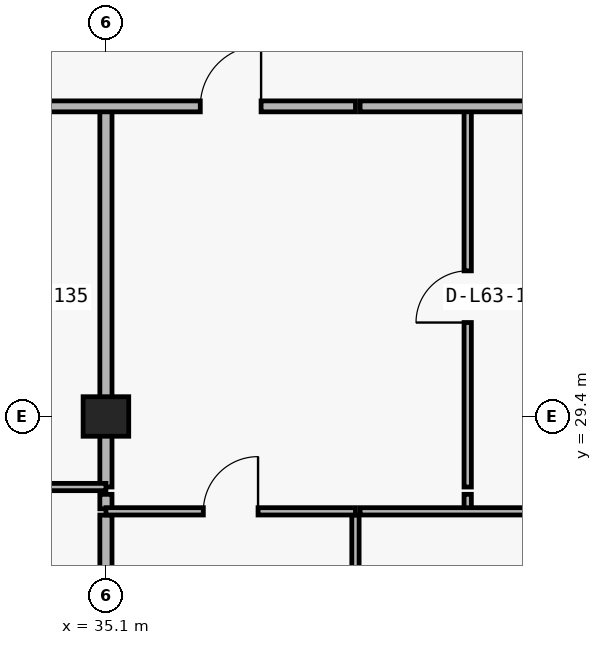
"""IFC4 building model, lengths in metres.
Left out: names, types, materials, properties, quantities, classifications, styles, units other than length and angle.
Written with IfcOpenShell. Run it as: python <this file> out.ifc"""

import sys

from ifc_helpers import new_model, si_unit, direction, frame, frame_2d, origin, origin_2d, place, context, subcontext, project, spatial, rectangle, extrude, element, fill, save


model = new_model("IFC4")
c1 = context("Model", 3, precision=1e-05, world=origin(), true_north=direction((0.0, 1.0)))
c2 = subcontext(c1, "Body", "Model", "MODEL_VIEW")
j1 = project(units=[si_unit("LENGTHUNIT", "METRE"), si_unit("PLANEANGLEUNIT", "RADIAN")], contexts=[c1])
p1 = place(None, origin())
s1 = spatial("IfcSite", under=j1, at=p1, CompositionType="ELEMENT")
p2 = place(p1, origin())
s2 = spatial("IfcBuilding", under=s1, at=p2, CompositionType="ELEMENT")
p3 = place(p2, frame((0.0, 0.0, 226.5)))
s3 = spatial("IfcBuildingStorey", under=s2, at=p3, CompositionType="ELEMENT", Elevation=226.5)
p4 = place(p3, frame((35.1, 29.4, 0.0), z_axis=(0.0, 0.0, 1.0), x_axis=(1.0, 0.0, 0.0)))
e1 = element("IfcColumn", 1, at=p4, inside=s3, PredefinedType="COLUMN", context=c2, shape_type="SweptSolid", body=[
    extrude(rectangle(XDim=0.75, YDim=0.65, at=origin_2d()), origin(), (0.0, 0.0, 1.0), 3.05),
])
p5 = place(p3, frame((35.1, 23.09, 0.0), z_axis=(0.0, 0.0, 1.0), x_axis=(0.0, 1.0, 0.0)))
e2 = element("IfcWall", 2, at=p5, inside=s3, PredefinedType="PARTITIONING", context=c2, shape_type="SweptSolid", body=[
    extrude(rectangle(XDim=4.69, YDim=0.2, at=frame_2d((2.345, 0.0))), origin(), (0.0, 0.0, 1.0), 2.263),
])
p6 = place(p3, frame((35.1, 27.88, 0.0), z_axis=(0.0, 0.0, 1.0), x_axis=(0.0, 1.0, 0.0)))
e3 = element("IfcWall", 3, at=p6, inside=s3, PredefinedType="PARTITIONING", context=c2, shape_type="SweptSolid", body=[
    extrude(rectangle(XDim=0.24, YDim=0.2, at=frame_2d((0.12, 0.0))), origin(), (0.0, 0.0, 1.0), 2.263),
])
p7 = place(p3, frame((35.1, 28.24, 0.0), z_axis=(0.0, 0.0, 1.0), x_axis=(0.0, 1.0, 0.0)))
e4 = element("IfcWall", 4, at=p7, inside=s3, PredefinedType="PARTITIONING", context=c2, shape_type="SweptSolid", body=[
    extrude(rectangle(XDim=6.26, YDim=0.2, at=frame_2d((3.13, 0.0))), origin(), (0.0, 0.0, 1.0), 2.263),
])
p8 = place(p3, frame((39.204, 23.09, 0.0), z_axis=(0.0, 0.0, 1.0), x_axis=(0.0, 1.0, 0.0)))
e5 = element("IfcWall", 5, at=p8, inside=s3, PredefinedType="PARTITIONING", context=c2, shape_type="SweptSolid", body=[
    extrude(rectangle(XDim=4.69, YDim=0.12, at=frame_2d((2.345, 0.0))), origin(), (0.0, 0.0, 1.0), 3.05),
])
p9 = place(p8, frame((1.895, 0.0, 0.0)))
e6 = element("IfcOpeningElement", 6, at=p9, cuts=e5, PredefinedType="OPENING", context=c2, shape_type="SweptSolid", body=[
    extrude(rectangle(XDim=0.9, YDim=2.15, at=frame_2d((0.45, 1.075))), frame((0.0, 0.07, 0.0), z_axis=(0.0, -1.0, 0.0), x_axis=(1.0, 0.0, 0.0)), (0.0, 0.0, 1.0), 0.14),
])
p10 = place(p3, frame((41.05, 27.88, 0.0), z_axis=(0.0, 0.0, 1.0), x_axis=(0.0, 1.0, 0.0)))
e7 = element("IfcWall", 7, at=p10, inside=s3, PredefinedType="PARTITIONING", context=c2, shape_type="SweptSolid", body=[
    extrude(rectangle(XDim=0.24, YDim=0.12, at=frame_2d((0.12, 0.0))), origin(), (0.0, 0.0, 1.0), 3.05),
])
p11 = place(p3, frame((41.05, 28.24, 0.0), z_axis=(0.0, 0.0, 1.0), x_axis=(0.0, 1.0, 0.0)))
e8 = element("IfcWall", 8, at=p11, inside=s3, PredefinedType="PARTITIONING", context=c2, shape_type="SweptSolid", body=[
    extrude(rectangle(XDim=6.26, YDim=0.12, at=frame_2d((3.13, 0.0))), origin(), (0.0, 0.0, 1.0), 3.05),
])
p12 = place(p11, frame((2.705, 0.0, 0.0)))
e9 = element("IfcOpeningElement", 9, at=p12, cuts=e8, PredefinedType="OPENING", context=c2, shape_type="SweptSolid", body=[
    extrude(rectangle(XDim=0.85, YDim=2.1, at=frame_2d((0.425, 1.05))), frame((0.0, 0.07, 0.0), z_axis=(0.0, -1.0, 0.0), x_axis=(1.0, 0.0, 0.0)), (0.0, 0.0, 1.0), 0.14),
])
p13 = place(p3, frame((35.1, 27.84, 0.0), z_axis=(0.0, 0.0, 1.0), x_axis=(1.0, 0.0, 0.0)))
e10 = element("IfcWall", 10, at=p13, inside=s3, PredefinedType="PARTITIONING", context=c2, shape_type="SweptSolid", body=[
    extrude(rectangle(XDim=4.104, YDim=0.12, at=frame_2d((2.052, 0.0))), origin(), (0.0, 0.0, 1.0), 3.05),
])
p14 = place(p13, frame((1.602, 0.0, 0.0)))
e11 = element("IfcOpeningElement", 11, at=p14, cuts=e10, PredefinedType="OPENING", context=c2, shape_type="SweptSolid", body=[
    extrude(rectangle(XDim=0.9, YDim=2.15, at=frame_2d((0.45, 1.075))), frame((0.0, 0.07, 0.0), z_axis=(0.0, -1.0, 0.0), x_axis=(1.0, 0.0, 0.0)), (0.0, 0.0, 1.0), 0.14),
])
p15 = place(p3, frame((39.28, 27.84, 0.0), z_axis=(0.0, 0.0, 1.0), x_axis=(1.0, 0.0, 0.0)))
e12 = element("IfcWall", 12, at=p15, inside=s3, PredefinedType="PARTITIONING", context=c2, shape_type="SweptSolid", body=[
    extrude(rectangle(XDim=3.42, YDim=0.12, at=frame_2d((1.71, 0.0))), origin(), (0.0, 0.0, 1.0), 3.05),
])
p16 = place(p3, frame((26.92, 28.24, 0.0), z_axis=(0.0, 0.0, 1.0), x_axis=(1.0, 0.0, 0.0)))
e13 = element("IfcWall", 13, at=p16, inside=s3, PredefinedType="PARTITIONING", context=c2, shape_type="SweptSolid", body=[
    extrude(rectangle(XDim=8.18, YDim=0.12, at=frame_2d((4.09, 0.0))), origin(), (0.0, 0.0, 1.0), 3.05),
])
p17 = place(p16, frame((1.583, 0.0, 0.0)))
e14 = element("IfcOpeningElement", 14, at=p17, cuts=e13, PredefinedType="OPENING", context=c2, shape_type="SweptSolid", body=[
    extrude(rectangle(XDim=0.9, YDim=2.15, at=frame_2d((0.45, 1.075))), frame((0.0, 0.07, 0.0), z_axis=(0.0, -1.0, 0.0), x_axis=(1.0, 0.0, 0.0)), (0.0, 0.0, 1.0), 0.14),
])
p18 = place(p3, frame((12.105, 34.5, 0.0), z_axis=(0.0, 0.0, 1.0), x_axis=(1.0, 0.0, 0.0)))
e15 = element("IfcWall", 15, at=p18, inside=s3, PredefinedType="PARTITIONING", context=c2, shape_type="SweptSolid", body=[
    extrude(rectangle(XDim=27.099, YDim=0.18, at=frame_2d((13.55, 0.0))), origin(), (0.0, 0.0, 1.0), 3.05),
])
p19 = place(p18, frame((1.772, 0.0, 0.0)))
e16 = element("IfcOpeningElement", 16, at=p19, cuts=e15, PredefinedType="OPENING", context=c2, shape_type="SweptSolid", body=[
    extrude(rectangle(XDim=1.0, YDim=2.2, at=frame_2d((0.5, 1.1))), frame((0.0, 0.1, 0.0), z_axis=(0.0, -1.0, 0.0), x_axis=(1.0, 0.0, 0.0)), (0.0, 0.0, 1.0), 0.2),
])
p20 = place(p18, frame((9.07, 0.0, 0.0)))
e17 = element("IfcOpeningElement", 17, at=p20, cuts=e15, PredefinedType="OPENING", context=c2, shape_type="SweptSolid", body=[
    extrude(rectangle(XDim=1.0, YDim=2.2, at=frame_2d((0.5, 1.1))), frame((0.0, 0.1, 0.0), z_axis=(0.0, -1.0, 0.0), x_axis=(1.0, 0.0, 0.0)), (0.0, 0.0, 1.0), 0.2),
])
p21 = place(p18, frame((17.47, 0.0, 0.0)))
e18 = element("IfcOpeningElement", 18, at=p21, cuts=e15, PredefinedType="OPENING", context=c2, shape_type="SweptSolid", body=[
    extrude(rectangle(XDim=1.0, YDim=2.2, at=frame_2d((0.5, 1.1))), frame((0.0, 0.1, 0.0), z_axis=(0.0, -1.0, 0.0), x_axis=(1.0, 0.0, 0.0)), (0.0, 0.0, 1.0), 0.2),
])
p22 = place(p18, frame((24.547, 0.0, 0.0)))
e19 = element("IfcOpeningElement", 19, at=p22, cuts=e15, PredefinedType="OPENING", context=c2, shape_type="SweptSolid", body=[
    extrude(rectangle(XDim=1.0, YDim=2.2, at=frame_2d((0.5, 1.1))), frame((0.0, 0.1, 0.0), z_axis=(0.0, -1.0, 0.0), x_axis=(1.0, 0.0, 0.0)), (0.0, 0.0, 1.0), 0.2),
])
p23 = place(p3, frame((39.28, 34.5, 0.0), z_axis=(0.0, 0.0, 1.0), x_axis=(1.0, 0.0, 0.0)))
e20 = element("IfcWall", 20, at=p23, inside=s3, PredefinedType="PARTITIONING", context=c2, shape_type="SweptSolid", body=[
    extrude(rectangle(XDim=26.42, YDim=0.18, at=frame_2d((13.21, 0.0))), origin(), (0.0, 0.0, 1.0), 3.05),
])
p24 = place(p23, frame((6.295, 0.0, 0.0)))
e21 = element("IfcOpeningElement", 21, at=p24, cuts=e20, PredefinedType="OPENING", context=c2, shape_type="SweptSolid", body=[
    extrude(rectangle(XDim=1.0, YDim=2.2, at=frame_2d((0.5, 1.1))), frame((0.0, 0.1, 0.0), z_axis=(0.0, -1.0, 0.0), x_axis=(1.0, 0.0, 0.0)), (0.0, 0.0, 1.0), 0.2),
])
p25 = place(p23, frame((14.695, 0.0, 0.0)))
e22 = element("IfcOpeningElement", 22, at=p25, cuts=e20, PredefinedType="OPENING", context=c2, shape_type="SweptSolid", body=[
    extrude(rectangle(XDim=1.0, YDim=2.2, at=frame_2d((0.5, 1.1))), frame((0.0, 0.1, 0.0), z_axis=(0.0, -1.0, 0.0), x_axis=(1.0, 0.0, 0.0)), (0.0, 0.0, 1.0), 0.2),
])
p26 = place(p23, frame((21.995, 0.0, 0.0)))
e23 = element("IfcOpeningElement", 23, at=p26, cuts=e20, PredefinedType="OPENING", context=c2, shape_type="SweptSolid", body=[
    extrude(rectangle(XDim=1.0, YDim=2.2, at=frame_2d((0.5, 1.1))), frame((0.0, 0.1, 0.0), z_axis=(0.0, -1.0, 0.0), x_axis=(1.0, 0.0, 0.0)), (0.0, 0.0, 1.0), 0.2),
])
p27 = place(p22, origin())
e24 = element("IfcDoor", 24, at=p27, inside=s3, OperationType="SINGLE_SWING_RIGHT", PredefinedType="DOOR", context=c2, shape_type="SweptSolid", body=[
    extrude(rectangle(XDim=1.0, YDim=2.2, at=frame_2d((0.5, 1.1))), frame((0.0, 0.025, 0.0), z_axis=(0.0, -1.0, 0.0), x_axis=(1.0, 0.0, 0.0)), (0.0, 0.0, 1.0), 0.05),
])
fill(e19, e24)
p28 = place(p12, origin())
e25 = element("IfcDoor", 25, at=p28, inside=s3, OperationType="SINGLE_SWING_LEFT", PredefinedType="DOOR", context=c2, shape_type="SweptSolid", body=[
    extrude(rectangle(XDim=0.85, YDim=2.1, at=frame_2d((0.425, 1.05))), frame((0.0, 0.025, 0.0), z_axis=(0.0, -1.0, 0.0), x_axis=(1.0, 0.0, 0.0)), (0.0, 0.0, 1.0), 0.05),
])
fill(e9, e25)
p29 = place(p14, origin())
e26 = element("IfcDoor", 26, at=p29, inside=s3, OperationType="SINGLE_SWING_RIGHT", PredefinedType="DOOR", context=c2, shape_type="SweptSolid", body=[
    extrude(rectangle(XDim=0.9, YDim=2.15, at=frame_2d((0.45, 1.075))), frame((0.0, 0.025, 0.0), z_axis=(0.0, -1.0, 0.0), x_axis=(1.0, 0.0, 0.0)), (0.0, 0.0, 1.0), 0.05),
])
fill(e11, e26)
save(model, sys.argv[1])
